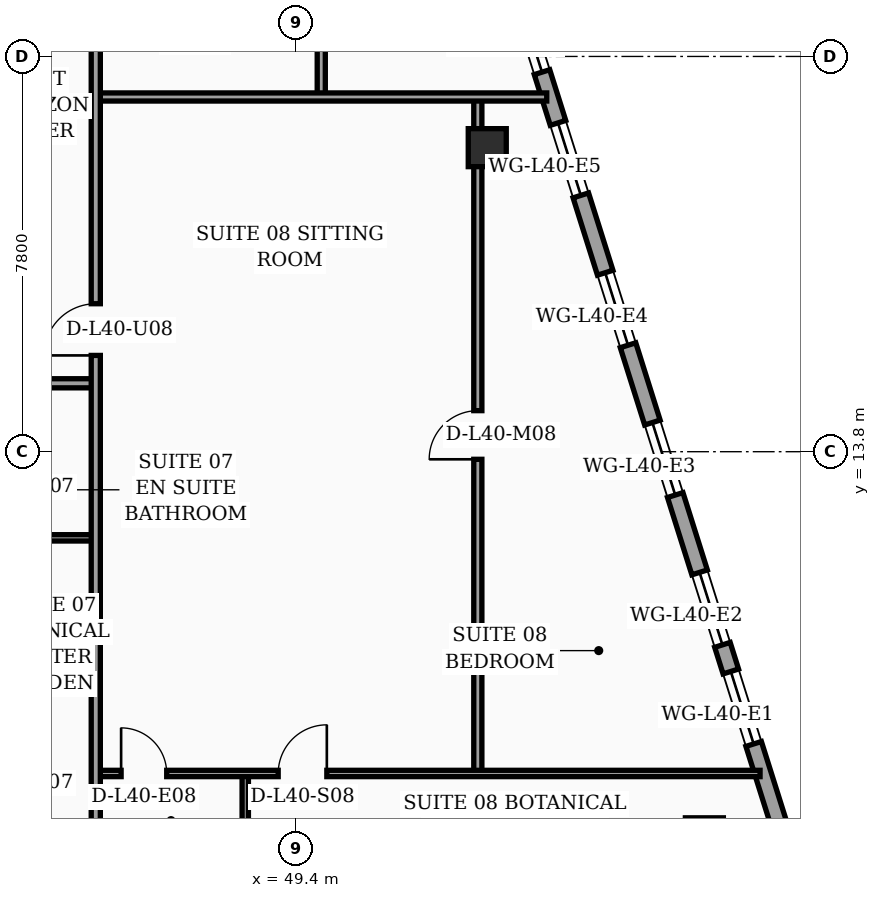
"""IFC4 building model, lengths in metres.
Left out: names, types, materials, properties, quantities, classifications, styles, units other than length and angle.
Written with IfcOpenShell. Run it as: python <this file> out.ifc"""

import sys

from ifc_helpers import new_model, si_unit, direction, frame, frame_2d, origin, origin_2d, place, context, subcontext, project, spatial, rectangle, hollow_rectangle, extrude, element, fill, save


model = new_model("IFC4")
c1 = context("Model", 3, precision=1e-05, world=origin(), true_north=direction((0.0, 1.0)))
c2 = subcontext(c1, "Body", "Model", "MODEL_VIEW")
j1 = project(units=[si_unit("LENGTHUNIT", "METRE"), si_unit("PLANEANGLEUNIT", "RADIAN")], contexts=[c1])
p1 = place(None, origin())
s1 = spatial("IfcSite", under=j1, at=p1, CompositionType="ELEMENT")
p2 = place(p1, origin())
s2 = spatial("IfcBuilding", under=s1, at=p2, CompositionType="ELEMENT")
p3 = place(p2, frame((0.0, 0.0, 163.7)))
s3 = spatial("IfcBuildingStorey", under=s2, at=p3, CompositionType="ELEMENT", Elevation=163.7)
for number, where, z_axis, x_axis in (
    (1, (57.461, 6.2, 0.0), (0.0, 0.0, 1.0), (1.0, 0.0, 0.0)),
    (2, (53.176, 19.8, 0.0), (0.0, 0.0, 1.0), (1.0, 0.0, 0.0)),
):
    element("IfcColumn", number, at=place(p3, frame(where, z_axis=z_axis, x_axis=x_axis)), inside=s3, PredefinedType="COLUMN", context=c2, shape_type="SweptSolid", body=[
        extrude(hollow_rectangle(XDim=0.75, YDim=0.75, WallThickness=0.032, at=origin_2d()), origin(), (0.0, 0.0, 1.0), 3.56),
    ])
p4 = place(p3, frame((59.23, 5.505, 0.0), z_axis=(0.0, 0.0, 1.0), x_axis=(-0.300509063924, 0.953778958931, 0.0)))
e3 = element("IfcWall", 3, at=p4, inside=s3, PredefinedType="SOLIDWALL", context=c2, shape_type="SweptSolid", body=[
    extrude(rectangle(XDim=30.814, YDim=0.32, at=frame_2d((15.407, 0.0))), origin(), (0.0, 0.0, 1.0), 3.56),
])
p5 = place(p4, frame((18.796, 0.0, 0.0)))
e4 = element("IfcOpeningElement", 4, at=p5, cuts=e3, PredefinedType="OPENING", context=c2, shape_type="SweptSolid", body=[
    extrude(rectangle(XDim=1.4, YDim=2.25, at=frame_2d((0.7, 1.125))), frame((0.0, 0.17, 0.0), z_axis=(0.0, -1.0, 0.0), x_axis=(1.0, 0.0, 0.0)), (0.0, 0.0, 1.0), 0.34),
])
p6 = place(p4, frame((2.65, 0.0, 0.75)))
e5 = element("IfcOpeningElement", 5, at=p6, cuts=e3, PredefinedType="OPENING", context=c2, shape_type="SweptSolid", body=[
    extrude(rectangle(XDim=1.5, YDim=1.6, at=frame_2d((0.75, 0.8))), frame((0.0, 0.17, 0.0), z_axis=(0.0, -1.0, 0.0), x_axis=(1.0, 0.0, 0.0)), (0.0, 0.0, 1.0), 0.34),
])
p7 = place(p4, frame((4.7, 0.0, 0.75)))
e6 = element("IfcOpeningElement", 6, at=p7, cuts=e3, PredefinedType="OPENING", context=c2, shape_type="SweptSolid", body=[
    extrude(rectangle(XDim=1.5, YDim=1.6, at=frame_2d((0.75, 0.8))), frame((0.0, 0.17, 0.0), z_axis=(0.0, -1.0, 0.0), x_axis=(1.0, 0.0, 0.0)), (0.0, 0.0, 1.0), 0.34),
])
p8 = place(p4, frame((7.8, 0.0, 0.75)))
e7 = element("IfcOpeningElement", 7, at=p8, cuts=e3, PredefinedType="OPENING", context=c2, shape_type="SweptSolid", body=[
    extrude(rectangle(XDim=1.5, YDim=1.6, at=frame_2d((0.75, 0.8))), frame((0.0, 0.17, 0.0), z_axis=(0.0, -1.0, 0.0), x_axis=(1.0, 0.0, 0.0)), (0.0, 0.0, 1.0), 0.34),
])
p9 = place(p4, frame((10.9, 0.0, 0.75)))
e8 = element("IfcOpeningElement", 8, at=p9, cuts=e3, PredefinedType="OPENING", context=c2, shape_type="SweptSolid", body=[
    extrude(rectangle(XDim=1.5, YDim=1.6, at=frame_2d((0.75, 0.8))), frame((0.0, 0.17, 0.0), z_axis=(0.0, -1.0, 0.0), x_axis=(1.0, 0.0, 0.0)), (0.0, 0.0, 1.0), 0.34),
])
p10 = place(p4, frame((14.0, 0.0, 0.75)))
e9 = element("IfcOpeningElement", 9, at=p10, cuts=e3, PredefinedType="OPENING", context=c2, shape_type="SweptSolid", body=[
    extrude(rectangle(XDim=1.5, YDim=1.6, at=frame_2d((0.75, 0.8))), frame((0.0, 0.17, 0.0), z_axis=(0.0, -1.0, 0.0), x_axis=(1.0, 0.0, 0.0)), (0.0, 0.0, 1.0), 0.34),
])
p11 = place(p4, frame((16.55, 0.0, 0.75)))
e10 = element("IfcOpeningElement", 10, at=p11, cuts=e3, PredefinedType="OPENING", context=c2, shape_type="SweptSolid", body=[
    extrude(rectangle(XDim=1.5, YDim=1.6, at=frame_2d((0.75, 0.8))), frame((0.0, 0.17, 0.0), z_axis=(0.0, -1.0, 0.0), x_axis=(1.0, 0.0, 0.0)), (0.0, 0.0, 1.0), 0.34),
])
p12 = place(p4, frame((20.75, 0.0, 0.75)))
e11 = element("IfcOpeningElement", 11, at=p12, cuts=e3, PredefinedType="OPENING", context=c2, shape_type="SweptSolid", body=[
    extrude(rectangle(XDim=1.5, YDim=1.6, at=frame_2d((0.75, 0.8))), frame((0.0, 0.17, 0.0), z_axis=(0.0, -1.0, 0.0), x_axis=(1.0, 0.0, 0.0)), (0.0, 0.0, 1.0), 0.34),
])
p13 = place(p4, frame((26.4, 0.0, 0.75)))
e12 = element("IfcOpeningElement", 12, at=p13, cuts=e3, PredefinedType="OPENING", context=c2, shape_type="SweptSolid", body=[
    extrude(rectangle(XDim=1.5, YDim=1.6, at=frame_2d((0.75, 0.8))), frame((0.0, 0.17, 0.0), z_axis=(0.0, -1.0, 0.0), x_axis=(1.0, 0.0, 0.0)), (0.0, 0.0, 1.0), 0.34),
])
p14 = place(p3, frame((43.52, 12.1, 0.0), z_axis=(0.0, 0.0, 1.0), x_axis=(1.0, 0.0, 0.0)))
e13 = element("IfcWall", 13, at=p14, inside=s3, PredefinedType="PARTITIONING", context=c2, shape_type="SweptSolid", body=[
    extrude(rectangle(XDim=1.93, YDim=0.125, at=frame_2d((0.965, 0.0))), origin(), (0.0, 0.0, 1.0), 3.56),
])
p15 = place(p3, frame((32.4, 15.15, 0.0), z_axis=(0.0, 0.0, 1.0), x_axis=(1.0, 0.0, 0.0)))
e14 = element("IfcWall", 14, at=p15, inside=s3, PredefinedType="PARTITIONING", context=c2, shape_type="SweptSolid", body=[
    extrude(rectangle(XDim=13.05, YDim=0.18, at=frame_2d((6.525, 0.0))), origin(), (0.0, 0.0, 1.0), 2.94),
])
p16 = place(p15, frame((2.0, 0.0, 0.0)))
e15 = element("IfcOpeningElement", 15, at=p16, cuts=e14, PredefinedType="OPENING", context=c2, shape_type="SweptSolid", body=[
    extrude(rectangle(XDim=1.02, YDim=2.2, at=frame_2d((0.51, 1.1))), frame((0.0, 0.1, 0.0), z_axis=(0.0, -1.0, 0.0), x_axis=(1.0, 0.0, 0.0)), (0.0, 0.0, 1.0), 0.2),
])
p17 = place(p15, frame((8.43, 0.0, 0.0)))
e16 = element("IfcOpeningElement", 16, at=p17, cuts=e14, PredefinedType="OPENING", context=c2, shape_type="SweptSolid", body=[
    extrude(rectangle(XDim=1.02, YDim=2.2, at=frame_2d((0.51, 1.1))), frame((0.0, 0.1, 0.0), z_axis=(0.0, -1.0, 0.0), x_axis=(1.0, 0.0, 0.0)), (0.0, 0.0, 1.0), 0.2),
])
p18 = place(p3, frame((48.4, 5.66, 0.0), z_axis=(0.0, 0.0, 1.0), x_axis=(0.0, 1.0, 0.0)))
e17 = element("IfcWall", 17, at=p18, inside=s3, PredefinedType="PARTITIONING", context=c2, shape_type="SweptSolid", body=[
    extrude(rectangle(XDim=1.79, YDim=0.125, at=frame_2d((0.895, 0.0))), origin(), (0.0, 0.0, 1.0), 2.94),
])
p19 = place(p3, frame((52.99, 7.45, 0.0), z_axis=(0.0, 0.0, 1.0), x_axis=(0.0, 1.0, 0.0)))
e18 = element("IfcWall", 18, at=p19, inside=s3, PredefinedType="PARTITIONING", context=c2, shape_type="SweptSolid", body=[
    extrude(rectangle(XDim=13.35, YDim=0.16, at=frame_2d((6.675, 0.0))), origin(), (0.0, 0.0, 1.0), 2.94),
])
p20 = place(p19, frame((6.2, 0.0, 0.0)))
e19 = element("IfcOpeningElement", 19, at=p20, cuts=e18, PredefinedType="OPENING", context=c2, shape_type="SweptSolid", body=[
    extrude(rectangle(XDim=0.96, YDim=2.2, at=frame_2d((0.48, 1.1))), frame((0.0, 0.09, 0.0), z_axis=(0.0, -1.0, 0.0), x_axis=(1.0, 0.0, 0.0)), (0.0, 0.0, 1.0), 0.18),
])
p21 = place(p3, frame((45.45, 7.45, 0.0), z_axis=(0.0, 0.0, 1.0), x_axis=(1.0, 0.0, 0.0)))
e20 = element("IfcWall", 20, at=p21, inside=s3, PredefinedType="PARTITIONING", context=c2, shape_type="SweptSolid", body=[
    extrude(rectangle(XDim=13.11, YDim=0.125, at=frame_2d((6.555, 0.0))), origin(), (0.0, 0.0, 1.0), 2.94),
])
p22 = place(p21, frame((0.5, 0.0, 0.0)))
e21 = element("IfcOpeningElement", 21, at=p22, cuts=e20, PredefinedType="OPENING", context=c2, shape_type="SweptSolid", body=[
    extrude(rectangle(XDim=0.9, YDim=2.15, at=frame_2d((0.45, 1.075))), frame((0.0, 0.073, 0.0), z_axis=(0.0, -1.0, 0.0), x_axis=(1.0, 0.0, 0.0)), (0.0, 0.0, 1.0), 0.145),
])
p23 = place(p21, frame((3.6, 0.0, 0.0)))
e22 = element("IfcOpeningElement", 22, at=p23, cuts=e20, PredefinedType="OPENING", context=c2, shape_type="SweptSolid", body=[
    extrude(rectangle(XDim=0.96, YDim=2.2, at=frame_2d((0.48, 1.1))), frame((0.0, 0.073, 0.0), z_axis=(0.0, -1.0, 0.0), x_axis=(1.0, 0.0, 0.0)), (0.0, 0.0, 1.0), 0.145),
])
p24 = place(p3, frame((49.9, 20.8, 0.0), z_axis=(0.0, 0.0, 1.0), x_axis=(0.0, 1.0, 0.0)))
e23 = element("IfcWall", 23, at=p24, inside=s3, PredefinedType="PARTITIONING", context=c2, shape_type="SweptSolid", body=[
    extrude(rectangle(XDim=7.35, YDim=0.16, at=frame_2d((3.675, 0.0))), origin(), (0.0, 0.0, 1.0), 3.04),
])
p25 = place(p24, frame((3.19, 0.0, 0.0)))
e24 = element("IfcOpeningElement", 24, at=p25, cuts=e23, PredefinedType="OPENING", context=c2, shape_type="SweptSolid", body=[
    extrude(rectangle(XDim=0.96, YDim=2.2, at=frame_2d((0.48, 1.1))), frame((0.0, 0.09, 0.0), z_axis=(0.0, -1.0, 0.0), x_axis=(1.0, 0.0, 0.0)), (0.0, 0.0, 1.0), 0.18),
])
p26 = place(p3, frame((45.45, 20.8, 0.0), z_axis=(0.0, 0.0, 1.0), x_axis=(1.0, 0.0, 0.0)))
e25 = element("IfcWall", 25, at=p26, inside=s3, PredefinedType="PARTITIONING", context=c2, shape_type="SweptSolid", body=[
    extrude(rectangle(XDim=8.9, YDim=0.16, at=frame_2d((4.45, 0.0))), origin(), (0.0, 0.0, 1.0), 2.94),
])
p27 = place(p3, frame((45.45, 2.44, 0.0), z_axis=(0.0, 0.0, 1.0), x_axis=(0.0, 1.0, 0.0)))
e26 = element("IfcWall", 26, at=p27, inside=s3, PredefinedType="PARTITIONING", context=c2, shape_type="SweptSolid", body=[
    extrude(rectangle(XDim=27.84, YDim=0.18, at=frame_2d((13.92, 0.0))), origin(), (0.0, 0.0, 1.0), 2.94),
])
p28 = place(p27, frame((13.26, 0.0, 0.0)))
e27 = element("IfcOpeningElement", 27, at=p28, cuts=e26, PredefinedType="OPENING", context=c2, shape_type="SweptSolid", body=[
    extrude(rectangle(XDim=1.02, YDim=2.2, at=frame_2d((0.51, 1.1))), frame((0.0, 0.1, 0.0), z_axis=(0.0, -1.0, 0.0), x_axis=(1.0, 0.0, 0.0)), (0.0, 0.0, 1.0), 0.2),
])
p29 = place(p27, frame((21.52, 0.0, 0.0)))
e28 = element("IfcOpeningElement", 28, at=p29, cuts=e26, PredefinedType="OPENING", context=c2, shape_type="SweptSolid", body=[
    extrude(rectangle(XDim=1.02, YDim=2.2, at=frame_2d((0.51, 1.1))), frame((0.0, 0.1, 0.0), z_axis=(0.0, -1.0, 0.0), x_axis=(1.0, 0.0, 0.0)), (0.0, 0.0, 1.0), 0.2),
])
p30 = place(p6, origin())
e29 = element("IfcWindow", 29, at=p30, inside=s3, PartitioningType="SINGLE_PANEL", PredefinedType="WINDOW", context=c2, shape_type="SweptSolid", body=[
    extrude(rectangle(XDim=1.5, YDim=1.6, at=frame_2d((0.75, 0.8))), frame((0.0, 0.03, 0.0), z_axis=(0.0, -1.0, 0.0), x_axis=(1.0, 0.0, 0.0)), (0.0, 0.0, 1.0), 0.06),
])
fill(e5, e29)
p31 = place(p7, origin())
e30 = element("IfcWindow", 30, at=p31, inside=s3, PartitioningType="SINGLE_PANEL", PredefinedType="WINDOW", context=c2, shape_type="SweptSolid", body=[
    extrude(rectangle(XDim=1.5, YDim=1.6, at=frame_2d((0.75, 0.8))), frame((0.0, 0.03, 0.0), z_axis=(0.0, -1.0, 0.0), x_axis=(1.0, 0.0, 0.0)), (0.0, 0.0, 1.0), 0.06),
])
fill(e6, e30)
p32 = place(p8, origin())
e31 = element("IfcWindow", 31, at=p32, inside=s3, PartitioningType="SINGLE_PANEL", PredefinedType="WINDOW", context=c2, shape_type="SweptSolid", body=[
    extrude(rectangle(XDim=1.5, YDim=1.6, at=frame_2d((0.75, 0.8))), frame((0.0, 0.03, 0.0), z_axis=(0.0, -1.0, 0.0), x_axis=(1.0, 0.0, 0.0)), (0.0, 0.0, 1.0), 0.06),
])
fill(e7, e31)
p33 = place(p9, origin())
e32 = element("IfcWindow", 32, at=p33, inside=s3, PartitioningType="SINGLE_PANEL", PredefinedType="WINDOW", context=c2, shape_type="SweptSolid", body=[
    extrude(rectangle(XDim=1.5, YDim=1.6, at=frame_2d((0.75, 0.8))), frame((0.0, 0.03, 0.0), z_axis=(0.0, -1.0, 0.0), x_axis=(1.0, 0.0, 0.0)), (0.0, 0.0, 1.0), 0.06),
])
fill(e8, e32)
p34 = place(p10, origin())
e33 = element("IfcWindow", 33, at=p34, inside=s3, PartitioningType="SINGLE_PANEL", PredefinedType="WINDOW", context=c2, shape_type="SweptSolid", body=[
    extrude(rectangle(XDim=1.5, YDim=1.6, at=frame_2d((0.75, 0.8))), frame((0.0, 0.03, 0.0), z_axis=(0.0, -1.0, 0.0), x_axis=(1.0, 0.0, 0.0)), (0.0, 0.0, 1.0), 0.06),
])
fill(e9, e33)
p35 = place(p11, origin())
e34 = element("IfcWindow", 34, at=p35, inside=s3, PartitioningType="SINGLE_PANEL", PredefinedType="WINDOW", context=c2, shape_type="SweptSolid", body=[
    extrude(rectangle(XDim=1.5, YDim=1.6, at=frame_2d((0.75, 0.8))), frame((0.0, 0.03, 0.0), z_axis=(0.0, -1.0, 0.0), x_axis=(1.0, 0.0, 0.0)), (0.0, 0.0, 1.0), 0.06),
])
fill(e10, e34)
p36 = place(p20, origin())
e35 = element("IfcDoor", 35, at=p36, inside=s3, OperationType="SINGLE_SWING_LEFT", PredefinedType="DOOR", context=c2, shape_type="SweptSolid", body=[
    extrude(rectangle(XDim=0.96, YDim=2.2, at=frame_2d((0.48, 1.1))), frame((0.0, 0.025, 0.0), z_axis=(0.0, -1.0, 0.0), x_axis=(1.0, 0.0, 0.0)), (0.0, 0.0, 1.0), 0.05),
])
fill(e19, e35)
p37 = place(p22, origin())
e36 = element("IfcDoor", 36, at=p37, inside=s3, OperationType="SINGLE_SWING_LEFT", PredefinedType="DOOR", context=c2, shape_type="SweptSolid", body=[
    extrude(rectangle(XDim=0.9, YDim=2.15, at=frame_2d((0.45, 1.075))), frame((0.0, 0.025, 0.0), z_axis=(0.0, -1.0, 0.0), x_axis=(1.0, 0.0, 0.0)), (0.0, 0.0, 1.0), 0.05),
])
fill(e21, e36)
p38 = place(p23, origin())
e37 = element("IfcDoor", 37, at=p38, inside=s3, OperationType="SINGLE_SWING_RIGHT", PredefinedType="DOOR", context=c2, shape_type="SweptSolid", body=[
    extrude(rectangle(XDim=0.96, YDim=2.2, at=frame_2d((0.48, 1.1))), frame((0.0, 0.025, 0.0), z_axis=(0.0, -1.0, 0.0), x_axis=(1.0, 0.0, 0.0)), (0.0, 0.0, 1.0), 0.05),
])
fill(e22, e37)
p39 = place(p28, origin())
e38 = element("IfcDoor", 38, at=p39, inside=s3, OperationType="SINGLE_SWING_LEFT", PredefinedType="DOOR", context=c2, shape_type="SweptSolid", body=[
    extrude(rectangle(XDim=1.02, YDim=2.2, at=frame_2d((0.51, 1.1))), frame((0.0, 0.025, 0.0), z_axis=(0.0, -1.0, 0.0), x_axis=(1.0, 0.0, 0.0)), (0.0, 0.0, 1.0), 0.05),
])
fill(e27, e38)
save(model, sys.argv[1])
